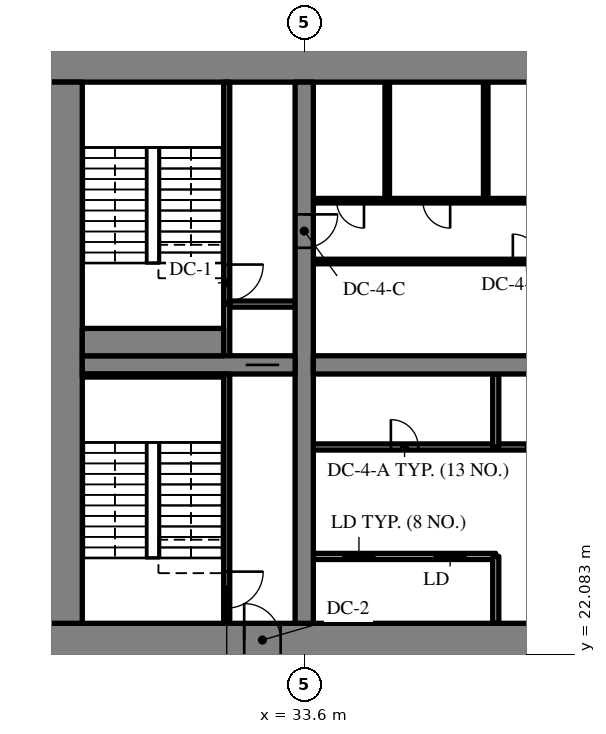
"""IFC4 building model, lengths in metres.
Left out: names, types, materials, properties, quantities, classifications, styles, units other than length and angle.
Written with IfcOpenShell. Run it as: python <this file> out.ifc"""

import sys

from ifc_helpers import new_model, si_unit, direction, frame, frame_2d, origin, place, context, subcontext, project, spatial, rectangle, extrude, source, transform, mapped, element, fill, save


model = new_model("IFC4")
c1 = context("Model", 3, precision=1e-05, world=origin(), true_north=direction((0.0, 1.0)))
c2 = subcontext(c1, "Body", "Model", "MODEL_VIEW")
j1 = project(units=[si_unit("LENGTHUNIT", "METRE"), si_unit("PLANEANGLEUNIT", "RADIAN")], contexts=[c1])
p1 = place(None, origin())
s1 = spatial("IfcSite", under=j1, at=p1, CompositionType="ELEMENT")
p2 = place(p1, origin())
s2 = spatial("IfcBuilding", under=s1, at=p2, CompositionType="ELEMENT")
p3 = place(p2, frame((0.0, 0.0, -13.5)))
s3 = spatial("IfcBuildingStorey", under=s2, at=p3, CompositionType="ELEMENT", Elevation=-13.5)
m1 = source(origin(), c2, "Body", "SweptSolid", [
    extrude(rectangle(XDim=50.4, YDim=1.1, at=frame_2d((25.2, 0.0))), origin(), (0.0, 0.0, 1.0), 4.52),
])
p4 = place(p3, frame((25.2, 22.55, -0.3), z_axis=(0.0, 0.0, 1.0), x_axis=(1.0, 0.0, 0.0)))
e1 = element("IfcWall", 1, at=p4, inside=s3, PredefinedType="SHEAR", context=c2, shape_type="MappedRepresentation", body=[
    mapped(m1, transform((0.0, 0.0, 0.0), scale=1.0)),
])
m2 = source(origin(), c2, "Body", "SweptSolid", [
    extrude(rectangle(XDim=1.8, YDim=2.1, at=frame_2d((0.9, 1.05))), frame((0.0, 0.56, 0.0), z_axis=(0.0, -1.0, 0.0), x_axis=(1.0, 0.0, 0.0)), (0.0, 0.0, 1.0), 1.12),
])
p5 = place(p4, frame((15.9, 0.0, 0.0)))
e2 = element("IfcOpeningElement", 2, at=p5, cuts=e1, PredefinedType="OPENING", context=c2, shape_type="MappedRepresentation", body=[
    mapped(m2, transform((0.0, 0.0, 0.0), scale=1.0)),
])
m3 = source(origin(), c2, "Body", "SweptSolid", [
    extrude(rectangle(XDim=1.2, YDim=2.1, at=frame_2d((0.6, 1.05))), frame((0.0, 0.56, 0.0), z_axis=(0.0, -1.0, 0.0), x_axis=(1.0, 0.0, 0.0)), (0.0, 0.0, 1.0), 1.12),
])
p6 = place(p4, frame((27.0, 0.0, 0.0)))
e3 = element("IfcOpeningElement", 3, at=p6, cuts=e1, PredefinedType="OPENING", context=c2, shape_type="MappedRepresentation", body=[
    mapped(m3, transform((0.0, 0.0, 0.0), scale=1.0)),
])
m4 = source(origin(), c2, "Body", "SweptSolid", [
    extrude(rectangle(XDim=0.9, YDim=2.1, at=frame_2d((0.45, 1.05))), frame((0.0, 0.56, 0.0), z_axis=(0.0, -1.0, 0.0), x_axis=(1.0, 0.0, 0.0)), (0.0, 0.0, 1.0), 1.12),
])
p7 = place(p4, frame((33.75, 0.0, 0.0)))
e4 = element("IfcOpeningElement", 4, at=p7, cuts=e1, PredefinedType="OPENING", context=c2, shape_type="MappedRepresentation", body=[
    mapped(m4, transform((0.0, 0.0, 0.0), scale=1.0)),
])
p8 = place(p4, frame((30.75, 0.0, 0.0)))
e5 = element("IfcOpeningElement", 5, at=p8, cuts=e1, PredefinedType="OPENING", context=c2, shape_type="MappedRepresentation", body=[
    mapped(m4, transform((0.0, 0.0, 0.0), scale=1.0)),
])
p9 = place(p4, frame((38.25, 0.0, 0.0)))
e6 = element("IfcOpeningElement", 6, at=p9, cuts=e1, PredefinedType="OPENING", context=c2, shape_type="MappedRepresentation", body=[
    mapped(m4, transform((0.0, 0.0, 0.0), scale=1.0)),
])
p10 = place(p4, frame((6.425, 0.0, 0.0)))
e7 = element("IfcOpeningElement", 7, at=p10, cuts=e1, PredefinedType="OPENING", context=c2, shape_type="MappedRepresentation", body=[
    mapped(m3, transform((0.0, 0.0, 0.0), scale=1.0)),
])
p11 = place(p4, frame((47.675, 0.0, 0.0)))
e8 = element("IfcOpeningElement", 8, at=p11, cuts=e1, PredefinedType="OPENING", context=c2, shape_type="MappedRepresentation", body=[
    mapped(m3, transform((0.0, 0.0, 0.0), scale=1.0)),
])
p12 = place(p3, frame((25.2, 41.45, -0.3), z_axis=(0.0, 0.0, 1.0), x_axis=(1.0, 0.0, 0.0)))
e9 = element("IfcWall", 9, at=p12, inside=s3, PredefinedType="SHEAR", context=c2, shape_type="MappedRepresentation", body=[
    mapped(m1, transform((0.0, 0.0, 0.0), scale=1.0)),
])
m5 = source(origin(), c2, "Body", "SweptSolid", [
    extrude(rectangle(XDim=17.8, YDim=1.1, at=frame_2d((8.9, 0.0))), origin(), (0.0, 0.0, 1.0), 4.52),
])
p13 = place(p3, frame((25.75, 23.1, -0.3), z_axis=(0.0, 0.0, 1.0), x_axis=(0.0, 1.0, 0.0)))
e10 = element("IfcWall", 10, at=p13, inside=s3, PredefinedType="SHEAR", context=c2, shape_type="MappedRepresentation", body=[
    mapped(m5, transform((0.0, 0.0, 0.0), scale=1.0)),
])
m6 = source(origin(), c2, "Body", "SweptSolid", [
    extrude(rectangle(XDim=17.8, YDim=0.6, at=frame_2d((8.9, 0.0))), origin(), (0.0, 0.0, 1.0), 4.52),
])
p14 = place(p3, frame((33.6, 23.1, -0.3), z_axis=(0.0, 0.0, 1.0), x_axis=(0.0, 1.0, 0.0)))
e11 = element("IfcWall", 11, at=p14, inside=s3, PredefinedType="SHEAR", context=c2, shape_type="MappedRepresentation", body=[
    mapped(m6, transform((0.0, 0.0, 0.0), scale=1.0)),
])
m7 = source(origin(), c2, "Body", "SweptSolid", [
    extrude(rectangle(XDim=1.1, YDim=2.1, at=frame_2d((0.55, 1.05))), frame((0.0, 0.31, 0.0), z_axis=(0.0, -1.0, 0.0), x_axis=(1.0, 0.0, 0.0)), (0.0, 0.0, 1.0), 0.62),
])
p15 = place(p14, frame((12.35, 0.0, 0.0)))
e12 = element("IfcOpeningElement", 12, at=p15, cuts=e11, PredefinedType="OPENING", context=c2, shape_type="MappedRepresentation", body=[
    mapped(m7, transform((0.0, 0.0, 0.0), scale=1.0)),
])
m8 = source(origin(), c2, "Body", "SweptSolid", [
    extrude(rectangle(XDim=7.0, YDim=0.6, at=frame_2d((3.5, 0.0))), origin(), (0.0, 0.0, 1.0), 4.52),
])
p16 = place(p3, frame((26.3, 31.6, -0.3), z_axis=(0.0, 0.0, 1.0), x_axis=(1.0, 0.0, 0.0)))
e13 = element("IfcWall", 13, at=p16, inside=s3, PredefinedType="SHEAR", context=c2, shape_type="MappedRepresentation", body=[
    mapped(m8, transform((0.0, 0.0, 0.0), scale=1.0)),
])
p17 = place(p16, frame((5.375, 0.0, 0.0)))
e14 = element("IfcOpeningElement", 14, at=p17, cuts=e13, PredefinedType="OPENING", context=c2, shape_type="MappedRepresentation", body=[
    mapped(m7, transform((0.0, 0.0, 0.0), scale=1.0)),
])
m9 = source(origin(), c2, "Body", "SweptSolid", [
    extrude(rectangle(XDim=16.2, YDim=0.6, at=frame_2d((8.1, 0.0))), origin(), (0.0, 0.0, 1.0), 4.52),
])
p18 = place(p3, frame((33.9, 31.6, -0.3), z_axis=(0.0, 0.0, 1.0), x_axis=(1.0, 0.0, 0.0)))
e15 = element("IfcWall", 15, at=p18, inside=s3, PredefinedType="SHEAR", context=c2, shape_type="MappedRepresentation", body=[
    mapped(m9, transform((0.0, 0.0, 0.0), scale=1.0)),
])
m10 = source(origin(), c2, "Body", "SweptSolid", [
    extrude(rectangle(XDim=1.0, YDim=2.1, at=frame_2d((0.5, 1.05))), frame((0.0, 0.31, 0.0), z_axis=(0.0, -1.0, 0.0), x_axis=(1.0, 0.0, 0.0)), (0.0, 0.0, 1.0), 0.62),
])
p19 = place(p18, frame((14.65, 0.0, 0.0)))
e16 = element("IfcOpeningElement", 16, at=p19, cuts=e15, PredefinedType="OPENING", context=c2, shape_type="MappedRepresentation", body=[
    mapped(m10, transform((0.0, 0.0, 0.0), scale=1.0)),
])
m11 = source(origin(), c2, "Body", "SweptSolid", [
    extrude(rectangle(XDim=6.0, YDim=0.2, at=frame_2d((3.0, 0.0))), origin(), (0.0, 0.0, 1.0), 4.22),
])
p20 = place(p3, frame((33.9, 25.3, 0.0), z_axis=(0.0, 0.0, 1.0), x_axis=(1.0, 0.0, 0.0)))
e17 = element("IfcWall", 17, at=p20, inside=s3, PredefinedType="SOLIDWALL", context=c2, shape_type="MappedRepresentation", body=[
    mapped(m11, transform((0.0, 0.0, 0.0), scale=1.0)),
])
m12 = source(origin(), c2, "Body", "SweptSolid", [
    extrude(rectangle(XDim=1.1, YDim=2.1, at=frame_2d((0.55, 1.05))), frame((0.0, 0.11, 0.0), z_axis=(0.0, -1.0, 0.0), x_axis=(1.0, 0.0, 0.0)), (0.0, 0.0, 1.0), 0.22),
])
p21 = place(p20, frame((0.95, 0.0, 0.0)))
e18 = element("IfcOpeningElement", 18, at=p21, cuts=e17, PredefinedType="OPENING", context=c2, shape_type="MappedRepresentation", body=[
    mapped(m12, transform((0.0, 0.0, 0.0), scale=1.0)),
])
p22 = place(p20, frame((3.95, 0.0, 0.0)))
e19 = element("IfcOpeningElement", 19, at=p22, cuts=e17, PredefinedType="OPENING", context=c2, shape_type="MappedRepresentation", body=[
    mapped(m12, transform((0.0, 0.0, 0.0), scale=1.0)),
])
m13 = source(origin(), c2, "Body", "SweptSolid", [
    extrude(rectangle(XDim=12.0, YDim=0.2, at=frame_2d((6.0, 0.0))), origin(), (0.0, 0.0, 1.0), 4.22),
])
p23 = place(p3, frame((33.9, 28.9, 0.0), z_axis=(0.0, 0.0, 1.0), x_axis=(1.0, 0.0, 0.0)))
e20 = element("IfcWall", 20, at=p23, inside=s3, PredefinedType="SOLIDWALL", context=c2, shape_type="MappedRepresentation", body=[
    mapped(m13, transform((0.0, 0.0, 0.0), scale=1.0)),
])
p24 = place(p23, frame((6.95, 0.0, 0.0)))
e21 = element("IfcOpeningElement", 21, at=p24, cuts=e20, PredefinedType="OPENING", context=c2, shape_type="MappedRepresentation", body=[
    mapped(m12, transform((0.0, 0.0, 0.0), scale=1.0)),
])
p25 = place(p23, frame((9.95, 0.0, 0.0)))
e22 = element("IfcOpeningElement", 22, at=p25, cuts=e20, PredefinedType="OPENING", context=c2, shape_type="MappedRepresentation", body=[
    mapped(m12, transform((0.0, 0.0, 0.0), scale=1.0)),
])
m14 = source(origin(), c2, "Body", "SweptSolid", [
    extrude(rectangle(XDim=0.9, YDim=2.1, at=frame_2d((0.45, 1.05))), frame((0.0, 0.11, 0.0), z_axis=(0.0, -1.0, 0.0), x_axis=(1.0, 0.0, 0.0)), (0.0, 0.0, 1.0), 0.22),
])
p26 = place(p23, frame((2.55, 0.0, 0.0)))
e23 = element("IfcOpeningElement", 23, at=p26, cuts=e20, PredefinedType="OPENING", context=c2, shape_type="MappedRepresentation", body=[
    mapped(m14, transform((0.0, 0.0, 0.0), scale=1.0)),
])
m15 = source(origin(), c2, "Body", "SweptSolid", [
    extrude(rectangle(XDim=2.2, YDim=0.2, at=frame_2d((1.1, 0.0))), origin(), (0.0, 0.0, 1.0), 4.22),
])
p27 = place(p3, frame((39.9, 23.1, 0.0), z_axis=(0.0, 0.0, 1.0), x_axis=(0.0, 1.0, 0.0)))
e24 = element("IfcWall", 24, at=p27, inside=s3, PredefinedType="SOLIDWALL", context=c2, shape_type="MappedRepresentation", body=[
    mapped(m15, transform((0.0, 0.0, 0.0), scale=1.0)),
])
m16 = source(origin(), c2, "Body", "SweptSolid", [
    extrude(rectangle(XDim=2.4, YDim=0.2, at=frame_2d((1.2, 0.0))), origin(), (0.0, 0.0, 1.0), 4.22),
])
p28 = place(p3, frame((39.9, 28.9, 0.0), z_axis=(0.0, 0.0, 1.0), x_axis=(0.0, 1.0, 0.0)))
e25 = element("IfcWall", 25, at=p28, inside=s3, PredefinedType="PARTITIONING", context=c2, shape_type="MappedRepresentation", body=[
    mapped(m16, transform((0.0, 0.0, 0.0), scale=1.0)),
])
m17 = source(origin(), c2, "Body", "SweptSolid", [
    extrude(rectangle(XDim=14.1, YDim=0.15, at=frame_2d((7.05, 0.0))), origin(), (0.0, 0.0, 1.0), 4.22),
])
p29 = place(p3, frame((33.9, 35.0, 0.0), z_axis=(0.0, 0.0, 1.0), x_axis=(1.0, 0.0, 0.0)))
e26 = element("IfcWall", 26, at=p29, inside=s3, PredefinedType="PARTITIONING", context=c2, shape_type="MappedRepresentation", body=[
    mapped(m17, transform((0.0, 0.0, 0.0), scale=1.0)),
])
m18 = source(origin(), c2, "Body", "SweptSolid", [
    extrude(rectangle(XDim=0.9, YDim=2.1, at=frame_2d((0.45, 1.05))), frame((0.0, 0.085, 0.0), z_axis=(0.0, -1.0, 0.0), x_axis=(1.0, 0.0, 0.0)), (0.0, 0.0, 1.0), 0.17),
])
p30 = place(p29, frame((6.562, 0.0, 0.0)))
e27 = element("IfcOpeningElement", 27, at=p30, cuts=e26, PredefinedType="OPENING", context=c2, shape_type="MappedRepresentation", body=[
    mapped(m18, transform((0.0, 0.0, 0.0), scale=1.0)),
])
m19 = source(origin(), c2, "Body", "SweptSolid", [
    extrude(rectangle(XDim=16.2, YDim=0.15, at=frame_2d((8.1, 0.0))), origin(), (0.0, 0.0, 1.0), 4.22),
])
p31 = place(p3, frame((33.9, 37.0, 0.0), z_axis=(0.0, 0.0, 1.0), x_axis=(1.0, 0.0, 0.0)))
e28 = element("IfcWall", 28, at=p31, inside=s3, PredefinedType="PARTITIONING", context=c2, shape_type="MappedRepresentation", body=[
    mapped(m19, transform((0.0, 0.0, 0.0), scale=1.0)),
])
p32 = place(p31, frame((0.765, 0.0, 0.0)))
e29 = element("IfcOpeningElement", 29, at=p32, cuts=e28, PredefinedType="OPENING", context=c2, shape_type="MappedRepresentation", body=[
    mapped(m18, transform((0.0, 0.0, 0.0), scale=1.0)),
])
p33 = place(p31, frame((3.6, 0.0, 0.0)))
e30 = element("IfcOpeningElement", 30, at=p33, cuts=e28, PredefinedType="OPENING", context=c2, shape_type="MappedRepresentation", body=[
    mapped(m18, transform((0.0, 0.0, 0.0), scale=1.0)),
])
p34 = place(p31, frame((9.27, 0.0, 0.0)))
e31 = element("IfcOpeningElement", 31, at=p34, cuts=e28, PredefinedType="OPENING", context=c2, shape_type="MappedRepresentation", body=[
    mapped(m18, transform((0.0, 0.0, 0.0), scale=1.0)),
])
p35 = place(p31, frame((14.535, 0.0, 0.0)))
e32 = element("IfcOpeningElement", 32, at=p35, cuts=e28, PredefinedType="OPENING", context=c2, shape_type="MappedRepresentation", body=[
    mapped(m18, transform((0.0, 0.0, 0.0), scale=1.0)),
])
m20 = source(origin(), c2, "Body", "SweptSolid", [
    extrude(rectangle(XDim=3.9, YDim=0.15, at=frame_2d((1.95, 0.0))), origin(), (0.0, 0.0, 1.0), 4.22),
])
for number, where, z_axis, x_axis in (
    (33, (36.33, 37.0, 0.0), (0.0, 0.0, 1.0), (0.0, 1.0, 0.0)),
    (34, (39.57, 37.0, 0.0), (0.0, 0.0, 1.0), (0.0, 1.0, 0.0)),
):
    element("IfcWall", number, at=place(p3, frame(where, z_axis=z_axis, x_axis=x_axis)), inside=s3, PredefinedType="PARTITIONING", context=c2, shape_type="MappedRepresentation", body=[
        mapped(m20, transform((0.0, 0.0, 0.0), scale=1.0)),
    ])
m21 = source(origin(), c2, "Body", "SweptSolid", [
    extrude(rectangle(XDim=8.2, YDim=0.2, at=frame_2d((4.1, 0.0))), origin(), (0.0, 0.0, 1.0), 4.52),
])
p36 = place(p3, frame((31.05, 23.1, -0.3), z_axis=(0.0, 0.0, 1.0), x_axis=(0.0, 1.0, 0.0)))
e35 = element("IfcWall", 35, at=p36, inside=s3, PredefinedType="SOLIDWALL", context=c2, shape_type="MappedRepresentation", body=[
    mapped(m21, transform((0.0, 0.0, 0.0), scale=1.0)),
])
m22 = source(origin(), c2, "Body", "SweptSolid", [
    extrude(rectangle(XDim=1.2, YDim=2.1, at=frame_2d((0.6, 1.05))), frame((0.0, 0.11, 0.0), z_axis=(0.0, -1.0, 0.0), x_axis=(1.0, 0.0, 0.0)), (0.0, 0.0, 1.0), 0.22),
])
p37 = place(p36, frame((0.5, 0.0, 0.0)))
e36 = element("IfcOpeningElement", 36, at=p37, cuts=e35, PredefinedType="OPENING", context=c2, shape_type="MappedRepresentation", body=[
    mapped(m22, transform((0.0, 0.0, 0.0), scale=1.0)),
])
m23 = source(origin(), c2, "Body", "SweptSolid", [
    extrude(rectangle(XDim=1.7, YDim=0.2, at=frame_2d((0.85, 0.0))), origin(), (0.0, 0.0, 1.0), 4.22),
])
p38 = place(p3, frame((31.05, 31.9, 0.0), z_axis=(0.0, 0.0, 1.0), x_axis=(0.0, 1.0, 0.0)))
e37 = element("IfcWall", 37, at=p38, inside=s3, PredefinedType="SOLIDWALL", context=c2, shape_type="MappedRepresentation", body=[
    mapped(m23, transform((0.0, 0.0, 0.0), scale=1.0)),
])
m24 = source(origin(), c2, "Body", "SweptSolid", [
    extrude(rectangle(XDim=2.15, YDim=0.2, at=frame_2d((1.075, 0.0))), origin(), (0.0, 0.0, 1.0), 4.22),
])
p39 = place(p3, frame((31.15, 33.6, 0.0), z_axis=(0.0, 0.0, 1.0), x_axis=(1.0, 0.0, 0.0)))
e38 = element("IfcWall", 38, at=p39, inside=s3, PredefinedType="SOLIDWALL", context=c2, shape_type="MappedRepresentation", body=[
    mapped(m24, transform((0.0, 0.0, 0.0), scale=1.0)),
])
m25 = source(origin(), c2, "Body", "SweptSolid", [
    extrude(rectangle(XDim=7.3, YDim=0.2, at=frame_2d((3.65, 0.0))), origin(), (0.0, 0.0, 1.0), 4.52),
])
p40 = place(p3, frame((31.05, 33.6, -0.3), z_axis=(0.0, 0.0, 1.0), x_axis=(0.0, 1.0, 0.0)))
e39 = element("IfcWall", 39, at=p40, inside=s3, PredefinedType="SOLIDWALL", context=c2, shape_type="MappedRepresentation", body=[
    mapped(m25, transform((0.0, 0.0, 0.0), scale=1.0)),
])
p41 = place(p40, frame((0.1, 0.0, 0.0)))
e40 = element("IfcOpeningElement", 40, at=p41, cuts=e39, PredefinedType="OPENING", context=c2, shape_type="MappedRepresentation", body=[
    mapped(m22, transform((0.0, 0.0, 0.0), scale=1.0)),
])
m26 = source(origin(), c2, "Body", "SweptSolid", [
    extrude(rectangle(XDim=4.65, YDim=0.1, at=frame_2d((2.325, 0.0))), origin(), (0.0, 0.0, 1.0), 4.52),
])
p42 = place(p3, frame((26.3, 31.25, -0.3), z_axis=(0.0, 0.0, 1.0), x_axis=(1.0, 0.0, 0.0)))
e41 = element("IfcWall", 41, at=p42, inside=s3, PredefinedType="SOLIDWALL", context=c2, shape_type="MappedRepresentation", body=[
    mapped(m26, transform((0.0, 0.0, 0.0), scale=1.0)),
])
m27 = source(origin(), c2, "Body", "SweptSolid", [
    extrude(rectangle(XDim=4.65, YDim=0.9, at=frame_2d((2.325, 0.0))), origin(), (0.0, 0.0, 1.0), 4.52),
])
p43 = place(p3, frame((26.3, 32.35, -0.3), z_axis=(0.0, 0.0, 1.0), x_axis=(1.0, 0.0, 0.0)))
e42 = element("IfcWall", 42, at=p43, inside=s3, PredefinedType="SOLIDWALL", context=c2, shape_type="MappedRepresentation", body=[
    mapped(m27, transform((0.0, 0.0, 0.0), scale=1.0)),
])
m28 = source(origin(), c2, "Body", "SweptSolid", [
    extrude(rectangle(XDim=1.1, YDim=2.1, at=frame_2d((0.55, 1.05))), frame((0.0, 0.025, 0.0), z_axis=(0.0, -1.0, 0.0), x_axis=(1.0, 0.0, 0.0)), (0.0, 0.0, 1.0), 0.05),
])
p44 = place(p21, origin())
e43 = element("IfcDoor", 43, at=p44, inside=s3, OperationType="SLIDING_TO_LEFT", PredefinedType="DOOR", context=c2, shape_type="MappedRepresentation", body=[
    mapped(m28, transform((0.0, 0.0, 0.0), scale=1.0)),
])
fill(e18, e43)
p45 = place(p22, origin())
e44 = element("IfcDoor", 44, at=p45, inside=s3, OperationType="SLIDING_TO_RIGHT", PredefinedType="DOOR", context=c2, shape_type="MappedRepresentation", body=[
    mapped(m28, transform((0.0, 0.0, 0.0), scale=1.0)),
])
fill(e19, e44)
p46 = place(p24, origin())
e45 = element("IfcDoor", 45, at=p46, inside=s3, OperationType="SLIDING_TO_LEFT", PredefinedType="DOOR", context=c2, shape_type="MappedRepresentation", body=[
    mapped(m28, transform((0.0, 0.0, 0.0), scale=1.0)),
])
fill(e21, e45)
m29 = source(origin(), c2, "Body", "SweptSolid", [
    extrude(rectangle(XDim=0.9, YDim=2.1, at=frame_2d((0.45, 1.05))), frame((0.0, 0.025, 0.0), z_axis=(0.0, -1.0, 0.0), x_axis=(1.0, 0.0, 0.0)), (0.0, 0.0, 1.0), 0.05),
])
p47 = place(p26, origin())
e46 = element("IfcDoor", 46, at=p47, inside=s3, OperationType="SINGLE_SWING_LEFT", PredefinedType="DOOR", context=c2, shape_type="MappedRepresentation", body=[
    mapped(m29, transform((0.0, 0.0, 0.0), scale=1.0)),
])
fill(e23, e46)
p48 = place(p30, origin())
e47 = element("IfcDoor", 47, at=p48, inside=s3, OperationType="SINGLE_SWING_LEFT", PredefinedType="DOOR", context=c2, shape_type="MappedRepresentation", body=[
    mapped(m29, transform((0.0, 0.0, 0.0), scale=1.0)),
])
fill(e27, e47)
p49 = place(p32, origin())
e48 = element("IfcDoor", 48, at=p49, inside=s3, OperationType="SINGLE_SWING_RIGHT", PredefinedType="DOOR", context=c2, shape_type="MappedRepresentation", body=[
    mapped(m29, transform((0.0, 0.0, 0.0), scale=1.0)),
])
fill(e29, e48)
p50 = place(p33, origin())
e49 = element("IfcDoor", 49, at=p50, inside=s3, OperationType="SINGLE_SWING_RIGHT", PredefinedType="DOOR", context=c2, shape_type="MappedRepresentation", body=[
    mapped(m29, transform((0.0, 0.0, 0.0), scale=1.0)),
])
fill(e30, e49)
m30 = source(origin(), c2, "Body", "SweptSolid", [
    extrude(rectangle(XDim=1.2, YDim=2.1, at=frame_2d((0.6, 1.05))), frame((0.0, 0.025, 0.0), z_axis=(0.0, -1.0, 0.0), x_axis=(1.0, 0.0, 0.0)), (0.0, 0.0, 1.0), 0.05),
])
p51 = place(p37, origin())
e50 = element("IfcDoor", 50, at=p51, inside=s3, OperationType="SINGLE_SWING_RIGHT", PredefinedType="DOOR", context=c2, shape_type="MappedRepresentation", body=[
    mapped(m30, transform((0.0, 0.0, 0.0), scale=1.0)),
])
fill(e36, e50)
m31 = source(origin(), c2, "Body", "SweptSolid", [
    extrude(rectangle(XDim=1.2, YDim=2.1, at=frame_2d((0.6, 1.05))), frame((0.0, 0.325, 0.0), z_axis=(0.0, -1.0, 0.0), x_axis=(1.0, 0.0, 0.0)), (0.0, 0.0, 1.0), 0.05),
])
p52 = place(p10, origin())
e51 = element("IfcDoor", 51, at=p52, inside=s3, OperationType="SINGLE_SWING_LEFT", PredefinedType="DOOR", context=c2, shape_type="MappedRepresentation", body=[
    mapped(m31, transform((0.0, 0.0, 0.0), scale=1.0)),
])
fill(e7, e51)
p53 = place(p17, origin())
e52 = element("IfcDoor", 52, at=p53, inside=s3, OperationType="SLIDING_TO_RIGHT", PredefinedType="DOOR", context=c2, shape_type="MappedRepresentation", body=[
    mapped(m28, transform((0.0, 0.0, 0.0), scale=1.0)),
])
fill(e14, e52)
p54 = place(p41, origin())
e53 = element("IfcDoor", 53, at=p54, inside=s3, OperationType="SINGLE_SWING_RIGHT", PredefinedType="DOOR", context=c2, shape_type="MappedRepresentation", body=[
    mapped(m30, transform((0.0, 0.0, 0.0), scale=1.0)),
])
fill(e40, e53)
p55 = place(p15, origin())
e54 = element("IfcDoor", 54, at=p55, inside=s3, OperationType="SINGLE_SWING_RIGHT", PredefinedType="DOOR", context=c2, shape_type="MappedRepresentation", body=[
    mapped(m28, transform((0.0, 0.0, 0.0), scale=1.0)),
])
fill(e12, e54)
save(model, sys.argv[1])
